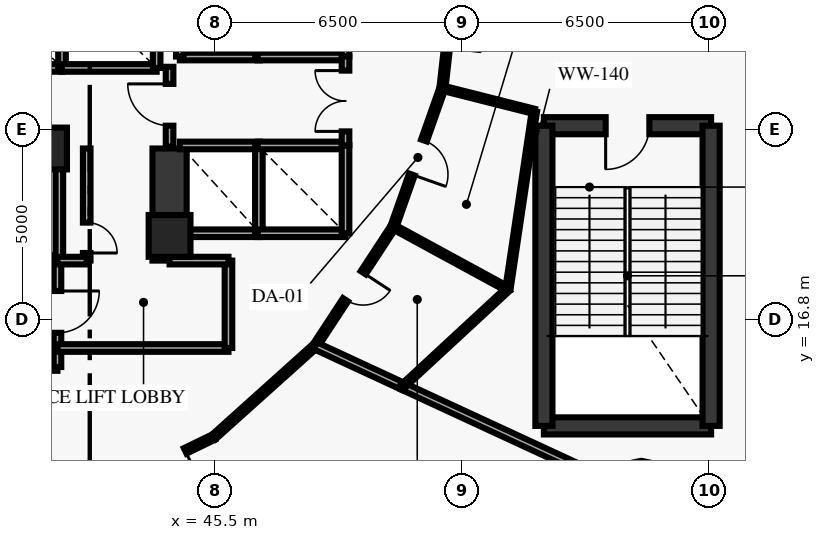
"""IFC4 building model, lengths in metres.
Left out: names, types, materials, properties, quantities, classifications, styles, units other than length and angle.
Written with IfcOpenShell. Run it as: python <this file> out.ifc"""

import sys

from ifc_helpers import new_model, si_unit, direction, frame, frame_2d, origin, origin_2d, place, context, subcontext, project, spatial, rectangle, extrude, element, fill, save


model = new_model("IFC4")
c1 = context("Model", 3, precision=1e-05, world=origin(), true_north=direction((0.0, 1.0)))
c2 = subcontext(c1, "Body", "Model", "MODEL_VIEW")
j1 = project(units=[si_unit("LENGTHUNIT", "METRE"), si_unit("PLANEANGLEUNIT", "RADIAN")], contexts=[c1])
p1 = place(None, origin())
s1 = spatial("IfcSite", under=j1, at=p1, CompositionType="ELEMENT")
p2 = place(p1, origin())
s2 = spatial("IfcBuilding", under=s1, at=p2, CompositionType="ELEMENT")
p3 = place(p2, frame((0.0, 0.0, 11.0)))
s3 = spatial("IfcBuildingStorey", under=s2, at=p3, CompositionType="ELEMENT", Elevation=11.0)
for number, where, z_axis, x_axis in (
    (1, (41.05, 21.3, 0.0), (0.0, 0.0, 1.0), (1.0, 0.0, 0.0)),
    (2, (44.3, 19.0, 0.0), (0.0, 0.0, 1.0), (1.0, 0.0, 0.0)),
):
    element("IfcColumn", number, at=place(p3, frame(where, z_axis=z_axis, x_axis=x_axis)), inside=s3, PredefinedType="PILASTER", context=c2, shape_type="SweptSolid", body=[
        extrude(rectangle(XDim=1.1, YDim=1.1, at=origin_2d()), origin(), (0.0, 0.0, 1.0), 4.7),
    ])
p4 = place(p3, frame((44.3, 18.35, 0.0), z_axis=(0.0, 0.0, 1.0), x_axis=(0.0, 1.0, 0.0)))
e3 = element("IfcWall", 3, at=p4, inside=s3, PredefinedType="SHEAR", context=c2, shape_type="SweptSolid", body=[
    extrude(rectangle(XDim=2.95, YDim=0.9, at=frame_2d((1.475, 0.0))), origin(), (0.0, 0.0, 1.0), 4.7),
])
p5 = place(p3, frame((33.7, 21.3, 0.0), z_axis=(0.0, 0.0, 1.0), x_axis=(1.0, 0.0, 0.0)))
e4 = element("IfcWall", 4, at=p5, inside=s3, PredefinedType="SHEAR", context=c2, shape_type="SweptSolid", body=[
    extrude(rectangle(XDim=7.55, YDim=0.9, at=frame_2d((3.775, 0.0))), origin(), (0.0, 0.0, 1.0), 4.7),
])
p6 = place(p3, frame((54.15, 14.0, 0.0), z_axis=(0.0, 0.0, 1.0), x_axis=(1.0, 0.0, 0.0)))
e5 = element("IfcWall", 5, at=p6, inside=s3, PredefinedType="SHEAR", context=c2, shape_type="SweptSolid", body=[
    extrude(rectangle(XDim=4.4, YDim=0.45, at=frame_2d((2.2, 0.0))), origin(), (0.0, 0.0, 1.0), 4.7),
])
p7 = place(p3, frame((58.55, 21.9, 0.0), z_axis=(0.0, 0.0, 1.0), x_axis=(-1.0, 0.0, 0.0)))
e6 = element("IfcWall", 6, at=p7, inside=s3, PredefinedType="SHEAR", context=c2, shape_type="SweptSolid", body=[
    extrude(rectangle(XDim=4.4, YDim=0.45, at=frame_2d((2.2, 0.0))), origin(), (0.0, 0.0, 1.0), 4.7),
])
p8 = place(p7, frame((1.625, 0.0, 0.0)))
e7 = element("IfcOpeningElement", 7, at=p8, cuts=e6, PredefinedType="OPENING", context=c2, shape_type="SweptSolid", body=[
    extrude(rectangle(XDim=1.15, YDim=2.15, at=frame_2d((0.575, 1.075))), frame((0.0, 0.235, 0.0), z_axis=(0.0, -1.0, 0.0), x_axis=(1.0, 0.0, 0.0)), (0.0, 0.0, 1.0), 0.47),
])
for number, where, z_axis, x_axis in (
    (8, (54.15, 14.0, 0.0), (0.0, 0.0, 1.0), (0.0, 1.0, 0.0)),
    (9, (58.55, 14.0, 0.0), (0.0, 0.0, 1.0), (0.0, 1.0, 0.0)),
):
    element("IfcWall", number, at=place(p3, frame(where, z_axis=z_axis, x_axis=x_axis)), inside=s3, PredefinedType="SHEAR", context=c2, shape_type="SweptSolid", body=[
        extrude(rectangle(XDim=7.9, YDim=0.45, at=frame_2d((3.95, 0.0))), origin(), (0.0, 0.0, 1.0), 4.7),
    ])
p9 = place(p3, frame((44.57, 23.72, 0.0), z_axis=(0.0, 0.0, 1.0), x_axis=(1.0, 0.0, 0.0)))
e10 = element("IfcWall", 10, at=p9, inside=s3, PredefinedType="SOLIDWALL", context=c2, shape_type="SweptSolid", body=[
    extrude(rectangle(XDim=2.11, YDim=0.2, at=frame_2d((1.055, 0.0))), origin(), (0.0, 0.0, 1.0), 4.7),
])
for number, where, z_axis, x_axis in (
    (11, (44.57, 23.72, 0.0), (0.0, 0.0, 1.0), (0.0, 1.0, 0.0)),
    (12, (46.65, 23.72, 0.0), (0.0, 0.0, 1.0), (0.0, 1.0, 0.0)),
):
    element("IfcWall", number, at=place(p3, frame(where, z_axis=z_axis, x_axis=x_axis)), inside=s3, PredefinedType="SOLIDWALL", context=c2, shape_type="SweptSolid", body=[
        extrude(rectangle(XDim=2.41, YDim=0.2, at=frame_2d((1.205, 0.0))), origin(), (0.0, 0.0, 1.0), 4.7),
    ])
p10 = place(p3, frame((46.62, 23.72, 0.0), z_axis=(0.0, 0.0, 1.0), x_axis=(1.0, 0.0, 0.0)))
e13 = element("IfcWall", 13, at=p10, inside=s3, PredefinedType="SOLIDWALL", context=c2, shape_type="SweptSolid", body=[
    extrude(rectangle(XDim=2.31, YDim=0.2, at=frame_2d((1.155, 0.0))), origin(), (0.0, 0.0, 1.0), 4.7),
])
p11 = place(p3, frame((48.93, 23.72, 0.0), z_axis=(0.0, 0.0, 1.0), x_axis=(0.0, 1.0, 0.0)))
e14 = element("IfcWall", 14, at=p11, inside=s3, PredefinedType="SOLIDWALL", context=c2, shape_type="SweptSolid", body=[
    extrude(rectangle(XDim=2.41, YDim=0.2, at=frame_2d((1.205, 0.0))), origin(), (0.0, 0.0, 1.0), 4.7),
])
for number, where, z_axis, x_axis in (
    (15, (44.57, 19.07, 0.0), (0.0, 0.0, 1.0), (1.0, 0.0, 0.0)),
    (16, (44.57, 21.38, 0.0), (0.0, 0.0, 1.0), (1.0, 0.0, 0.0)),
):
    element("IfcWall", number, at=place(p3, frame(where, z_axis=z_axis, x_axis=x_axis)), inside=s3, PredefinedType="SOLIDWALL", context=c2, shape_type="SweptSolid", body=[
        extrude(rectangle(XDim=2.11, YDim=0.2, at=frame_2d((1.055, 0.0))), origin(), (0.0, 0.0, 1.0), 4.7),
    ])
for number, where, z_axis, x_axis in (
    (17, (46.65, 19.07, 0.0), (0.0, 0.0, 1.0), (0.0, 1.0, 0.0)),
    (18, (46.62, 19.07, 0.0), (0.0, 0.0, 1.0), (1.0, 0.0, 0.0)),
    (19, (46.62, 21.38, 0.0), (0.0, 0.0, 1.0), (1.0, 0.0, 0.0)),
    (20, (48.93, 19.07, 0.0), (0.0, 0.0, 1.0), (0.0, 1.0, 0.0)),
):
    element("IfcWall", number, at=place(p3, frame(where, z_axis=z_axis, x_axis=x_axis)), inside=s3, PredefinedType="SOLIDWALL", context=c2, shape_type="SweptSolid", body=[
        extrude(rectangle(XDim=2.31, YDim=0.2, at=frame_2d((1.155, 0.0))), origin(), (0.0, 0.0, 1.0), 4.7),
    ])
p12 = place(p3, frame((38.98, 23.42, 0.0), z_axis=(0.0, 0.0, 1.0), x_axis=(1.0, 0.0, 0.0)))
e21 = element("IfcWall", 21, at=p12, inside=s3, PredefinedType="SOLIDWALL", context=c2, shape_type="SweptSolid", body=[
    extrude(rectangle(XDim=2.5, YDim=0.2, at=frame_2d((1.25, 0.0))), origin(), (0.0, 0.0, 1.0), 4.7),
])
p13 = place(p3, frame((41.47, 23.42, 0.0), z_axis=(0.0, 0.0, 1.0), x_axis=(0.0, 1.0, 0.0)))
e22 = element("IfcWall", 22, at=p13, inside=s3, PredefinedType="SOLIDWALL", context=c2, shape_type="SweptSolid", body=[
    extrude(rectangle(XDim=2.41, YDim=0.2, at=frame_2d((1.205, 0.0))), origin(), (0.0, 0.0, 1.0), 4.7),
])
p14 = place(p3, frame((41.46, 23.42, 0.0), z_axis=(0.0, 0.0, 1.0), x_axis=(1.0, 0.0, 0.0)))
e23 = element("IfcWall", 23, at=p14, inside=s3, PredefinedType="SOLIDWALL", context=c2, shape_type="SweptSolid", body=[
    extrude(rectangle(XDim=2.5, YDim=0.2, at=frame_2d((1.25, 0.0))), origin(), (0.0, 0.0, 1.0), 4.7),
])
p15 = place(p3, frame((43.96, 23.42, 0.0), z_axis=(0.0, 0.0, 1.0), x_axis=(0.0, 1.0, 0.0)))
e24 = element("IfcWall", 24, at=p15, inside=s3, PredefinedType="SOLIDWALL", context=c2, shape_type="SweptSolid", body=[
    extrude(rectangle(XDim=2.41, YDim=0.2, at=frame_2d((1.205, 0.0))), origin(), (0.0, 0.0, 1.0), 4.7),
])
p16 = place(p3, frame((38.57, 18.37, 0.0), z_axis=(0.0, 0.0, 1.0), x_axis=(1.0, 0.0, 0.0)))
e25 = element("IfcWall", 25, at=p16, inside=s3, PredefinedType="SOLIDWALL", context=c2, shape_type="SweptSolid", body=[
    extrude(rectangle(XDim=2.83, YDim=0.2, at=frame_2d((1.415, 0.0))), origin(), (0.0, 0.0, 1.0), 4.7),
])
p17 = place(p16, frame((1.18, 0.0, 0.0)))
e26 = element("IfcOpeningElement", 26, at=p17, cuts=e25, PredefinedType="OPENING", context=c2, shape_type="SweptSolid", body=[
    extrude(rectangle(XDim=1.35, YDim=2.18, at=frame_2d((0.675, 1.09))), frame((0.0, 0.11, 0.0), z_axis=(0.0, -1.0, 0.0), x_axis=(1.0, 0.0, 0.0)), (0.0, 0.0, 1.0), 0.22),
])
p18 = place(p3, frame((41.4, 18.37, 0.0), z_axis=(0.0, 0.0, 1.0), x_axis=(0.0, 1.0, 0.0)))
e27 = element("IfcWall", 27, at=p18, inside=s3, PredefinedType="SOLIDWALL", context=c2, shape_type="SweptSolid", body=[
    extrude(rectangle(XDim=2.71, YDim=0.2, at=frame_2d((1.355, 0.0))), origin(), (0.0, 0.0, 1.0), 4.7),
])
p19 = place(p3, frame((48.93, 21.38, 0.0), z_axis=(0.0, 0.0, 1.0), x_axis=(0.0, 1.0, 0.0)))
e28 = element("IfcWall", 28, at=p19, inside=s3, PredefinedType="SOLIDWALL", context=c2, shape_type="SweptSolid", body=[
    extrude(rectangle(XDim=2.34, YDim=0.2, at=frame_2d((1.17, 0.0))), origin(), (0.0, 0.0, 1.0), 4.7),
])
p20 = place(p19, frame((0.37, 0.0, 0.0)))
e29 = element("IfcOpeningElement", 29, at=p20, cuts=e28, PredefinedType="OPENING", context=c2, shape_type="SweptSolid", body=[
    extrude(rectangle(XDim=1.6, YDim=2.2, at=frame_2d((0.8, 1.1))), frame((0.0, 0.11, 0.0), z_axis=(0.0, -1.0, 0.0), x_axis=(1.0, 0.0, 0.0)), (0.0, 0.0, 1.0), 0.22),
])
p21 = place(p3, frame((44.3, 21.35, 0.0), z_axis=(0.0, 0.0, 1.0), x_axis=(0.0, 1.0, 0.0)))
e30 = element("IfcWall", 30, at=p21, inside=s3, PredefinedType="SOLIDWALL", context=c2, shape_type="SweptSolid", body=[
    extrude(rectangle(XDim=2.1, YDim=0.2, at=frame_2d((1.05, 0.0))), origin(), (0.0, 0.0, 1.0), 3.92),
])
p22 = place(p21, frame((0.55, 0.0, 0.0)))
e31 = element("IfcOpeningElement", 31, at=p22, cuts=e30, PredefinedType="OPENING", context=c2, shape_type="SweptSolid", body=[
    extrude(rectangle(XDim=1.1, YDim=2.15, at=frame_2d((0.55, 1.075))), frame((0.0, 0.11, 0.0), z_axis=(0.0, -1.0, 0.0), x_axis=(1.0, 0.0, 0.0)), (0.0, 0.0, 1.0), 0.22),
])
p23 = place(p3, frame((33.8, 15.55, 0.0), z_axis=(0.0, 0.0, 1.0), x_axis=(1.0, 0.0, 0.0)))
e32 = element("IfcWall", 32, at=p23, inside=s3, PredefinedType="SOLIDWALL", context=c2, shape_type="SweptSolid", body=[
    extrude(rectangle(XDim=7.55, YDim=0.2, at=frame_2d((3.775, 0.0))), origin(), (0.0, 0.0, 1.0), 4.7),
])
p24 = place(p3, frame((41.35, 15.55, 0.0), z_axis=(0.0, 0.0, 1.0), x_axis=(0.0, 1.0, 0.0)))
e33 = element("IfcWall", 33, at=p24, inside=s3, PredefinedType="SOLIDWALL", context=c2, shape_type="SweptSolid", body=[
    extrude(rectangle(XDim=2.8, YDim=0.2, at=frame_2d((1.4, 0.0))), origin(), (0.0, 0.0, 1.0), 4.7),
])
p25 = place(p24, frame((0.9, 0.0, 0.0)))
e34 = element("IfcOpeningElement", 34, at=p25, cuts=e33, PredefinedType="OPENING", context=c2, shape_type="SweptSolid", body=[
    extrude(rectangle(XDim=1.1, YDim=2.15, at=frame_2d((0.55, 1.075))), frame((0.0, 0.11, 0.0), z_axis=(0.0, -1.0, 0.0), x_axis=(1.0, 0.0, 0.0)), (0.0, 0.0, 1.0), 0.22),
])
p26 = place(p3, frame((41.35, 16.05, 0.0), z_axis=(0.0, 0.0, 1.0), x_axis=(1.0, 0.0, 0.0)))
e35 = element("IfcWall", 35, at=p26, inside=s3, PredefinedType="SOLIDWALL", context=c2, shape_type="SweptSolid", body=[
    extrude(rectangle(XDim=4.5, YDim=0.2, at=frame_2d((2.25, 0.0))), origin(), (0.0, 0.0, 1.0), 4.7),
])
p27 = place(p3, frame((45.85, 16.05, 0.0), z_axis=(0.0, 0.0, 1.0), x_axis=(0.0, 1.0, 0.0)))
e36 = element("IfcWall", 36, at=p27, inside=s3, PredefinedType="SOLIDWALL", context=c2, shape_type="SweptSolid", body=[
    extrude(rectangle(XDim=2.3, YDim=0.2, at=frame_2d((1.15, 0.0))), origin(), (0.0, 0.0, 1.0), 4.7),
])
p28 = place(p3, frame((44.3, 18.35, 0.0), z_axis=(0.0, 0.0, 1.0), x_axis=(1.0, 0.0, 0.0)))
e37 = element("IfcWall", 37, at=p28, inside=s3, PredefinedType="SOLIDWALL", context=c2, shape_type="SweptSolid", body=[
    extrude(rectangle(XDim=1.55, YDim=0.2, at=frame_2d((0.775, 0.0))), origin(), (0.0, 0.0, 1.0), 4.7),
])
p29 = place(p3, frame((42.12, 18.35, 0.0), z_axis=(0.0, 0.0, 1.0), x_axis=(0.0, 1.0, 0.0)))
e38 = element("IfcWall", 38, at=p29, inside=s3, PredefinedType="SOLIDWALL", context=c2, shape_type="SweptSolid", body=[
    extrude(rectangle(XDim=2.95, YDim=0.2, at=frame_2d((1.475, 0.0))), origin(), (0.0, 0.0, 1.0), 4.7),
])
p30 = place(p29, frame((0.2, 0.0, 0.0)))
e39 = element("IfcOpeningElement", 39, at=p30, cuts=e38, PredefinedType="OPENING", context=c2, shape_type="SweptSolid", body=[
    extrude(rectangle(XDim=0.8, YDim=2.05, at=frame_2d((0.4, 1.025))), frame((0.0, 0.11, 0.0), z_axis=(0.0, -1.0, 0.0), x_axis=(1.0, 0.0, 0.0)), (0.0, 0.0, 1.0), 0.22),
])
p31 = place(p3, frame((41.35, 18.35, 0.0), z_axis=(0.0, 0.0, 1.0), x_axis=(1.0, 0.0, 0.0)))
e40 = element("IfcWall", 40, at=p31, inside=s3, PredefinedType="SOLIDWALL", context=c2, shape_type="SweptSolid", body=[
    extrude(rectangle(XDim=0.77, YDim=0.2, at=frame_2d((0.385, 0.0))), origin(), (0.0, 0.0, 1.0), 4.7),
])
p32 = place(p3, frame((45.46, 13.706, 0.0), z_axis=(0.0, 0.0, 1.0), x_axis=(-0.899789784655, -0.436323668199, 0.0)))
e41 = element("IfcWall", 41, at=p32, inside=s3, PredefinedType="PARTITIONING", context=c2, shape_type="SweptSolid", body=[
    extrude(rectangle(XDim=3.463, YDim=0.16, at=frame_2d((1.731, 0.0))), origin(), (0.0, 0.0, 1.0), 4.7),
])
p33 = place(p32, frame((0.832, 0.0, 0.0)))
e42 = element("IfcOpeningElement", 42, at=p33, cuts=e41, PredefinedType="OPENING", context=c2, shape_type="SweptSolid", body=[
    extrude(rectangle(XDim=1.8, YDim=2.3, at=frame_2d((0.9, 1.15))), frame((0.0, 0.09, 0.0), z_axis=(0.0, -1.0, 0.0), x_axis=(1.0, 0.0, 0.0)), (0.0, 0.0, 1.0), 0.18),
])
p34 = place(p3, frame((45.46, 13.706, 0.0), z_axis=(0.0, 0.0, 1.0), x_axis=(0.744066617248, 0.668105432621, 0.0)))
e43 = element("IfcWall", 43, at=p34, inside=s3, PredefinedType="PARTITIONING", context=c2, shape_type="SweptSolid", body=[
    extrude(rectangle(XDim=3.596, YDim=0.16, at=frame_2d((1.798, 0.0))), origin(), (0.0, 0.0, 1.0), 4.7),
])
p35 = place(p3, frame((50.189, 19.24, 0.0), z_axis=(0.0, 0.0, 1.0), x_axis=(-0.548318837904, -0.836269365694, 0.0)))
e44 = element("IfcWall", 44, at=p35, inside=s3, PredefinedType="PARTITIONING", context=c2, shape_type="SweptSolid", body=[
    extrude(rectangle(XDim=3.744, YDim=0.16, at=frame_2d((1.872, 0.0))), origin(), (0.0, 0.0, 1.0), 4.7),
])
p36 = place(p35, frame((1.447, 0.0, 0.0)))
e45 = element("IfcOpeningElement", 45, at=p36, cuts=e44, PredefinedType="OPENING", context=c2, shape_type="SweptSolid", body=[
    extrude(rectangle(XDim=0.85, YDim=2.1, at=frame_2d((0.425, 1.05))), frame((0.0, 0.09, 0.0), z_axis=(0.0, -1.0, 0.0), x_axis=(1.0, 0.0, 0.0)), (0.0, 0.0, 1.0), 0.18),
])
p37 = place(p3, frame((51.48, 22.887, 0.0), z_axis=(0.0, 0.0, 1.0), x_axis=(-0.333704620558, -0.942677689467, 0.0)))
e46 = element("IfcWall", 46, at=p37, inside=s3, PredefinedType="PARTITIONING", context=c2, shape_type="SweptSolid", body=[
    extrude(rectangle(XDim=3.869, YDim=0.16, at=frame_2d((1.934, 0.0))), origin(), (0.0, 0.0, 1.0), 4.7),
])
p38 = place(p37, frame((1.459, 0.0, 0.0)))
e47 = element("IfcOpeningElement", 47, at=p38, cuts=e46, PredefinedType="OPENING", context=c2, shape_type="SweptSolid", body=[
    extrude(rectangle(XDim=0.95, YDim=2.1, at=frame_2d((0.475, 1.05))), frame((0.0, 0.09, 0.0), z_axis=(0.0, -1.0, 0.0), x_axis=(1.0, 0.0, 0.0)), (0.0, 0.0, 1.0), 0.18),
])
p39 = place(p3, frame((51.92, 26.8, 0.0), z_axis=(0.0, 0.0, 1.0), x_axis=(-0.111724363671, -0.99373923469, 0.0)))
e48 = element("IfcWall", 48, at=p39, inside=s3, PredefinedType="PARTITIONING", context=c2, shape_type="SweptSolid", body=[
    extrude(rectangle(XDim=3.938, YDim=0.16, at=frame_2d((1.969, 0.0))), origin(), (0.0, 0.0, 1.0), 4.7),
])
p40 = place(p39, frame((1.069, 0.0, 0.0)))
e49 = element("IfcOpeningElement", 49, at=p40, cuts=e48, PredefinedType="OPENING", context=c2, shape_type="SweptSolid", body=[
    extrude(rectangle(XDim=1.8, YDim=2.3, at=frame_2d((0.9, 1.15))), frame((0.0, 0.09, 0.0), z_axis=(0.0, -1.0, 0.0), x_axis=(1.0, 0.0, 0.0)), (0.0, 0.0, 1.0), 0.18),
])
p41 = place(p3, frame((48.136, 16.109, 0.0), z_axis=(0.0, 0.0, 1.0), x_axis=(0.907508335547, -0.420034071133, 0.0)))
e50 = element("IfcWall", 50, at=p41, inside=s3, PredefinedType="PARTITIONING", context=c2, shape_type="SweptSolid", body=[
    extrude(rectangle(XDim=2.538, YDim=0.2, at=frame_2d((1.269, 0.0))), origin(), (0.0, 0.0, 1.0), 4.7),
])
p42 = place(p3, frame((50.439, 15.043, 0.0), z_axis=(0.0, 0.0, 1.0), x_axis=(0.907524397356, -0.419999366908, 0.0)))
e51 = element("IfcWall", 51, at=p42, inside=s3, PredefinedType="PARTITIONING", context=c2, shape_type="SweptSolid", body=[
    extrude(rectangle(XDim=7.614, YDim=0.2, at=frame_2d((3.807, 0.0))), origin(), (0.0, 0.0, 1.0), 4.7),
])
p43 = place(p3, frame((50.189, 19.24, 0.0), z_axis=(0.0, 0.0, 1.0), x_axis=(0.878392721738, -0.477939563541, 0.0)))
e52 = element("IfcWall", 52, at=p43, inside=s3, PredefinedType="PARTITIONING", context=c2, shape_type="SweptSolid", body=[
    extrude(rectangle(XDim=3.431, YDim=0.14, at=frame_2d((1.716, 0.0))), origin(), (0.0, 0.0, 1.0), 4.7),
])
p44 = place(p3, frame((51.48, 22.887, 0.0), z_axis=(0.0, 0.0, 1.0), x_axis=(0.969564374521, -0.244836524357, 0.0)))
e53 = element("IfcWall", 53, at=p44, inside=s3, PredefinedType="PARTITIONING", context=c2, shape_type="SweptSolid", body=[
    extrude(rectangle(XDim=2.496, YDim=0.14, at=frame_2d((1.248, 0.0))), origin(), (0.0, 0.0, 1.0), 4.7),
])
p45 = place(p3, frame((50.439, 15.043, 0.0), z_axis=(0.0, 0.0, 1.0), x_axis=(0.734032370371, 0.679114481695, 0.0)))
e54 = element("IfcWall", 54, at=p45, inside=s3, PredefinedType="PARTITIONING", context=c2, shape_type="SweptSolid", body=[
    extrude(rectangle(XDim=3.765, YDim=0.14, at=frame_2d((1.883, 0.0))), origin(), (0.0, 0.0, 1.0), 4.7),
])
p46 = place(p3, frame((53.203, 17.6, 0.0), z_axis=(0.0, 0.0, 1.0), x_axis=(0.147441370436, 0.989070797407, 0.0)))
e55 = element("IfcWall", 55, at=p46, inside=s3, PredefinedType="PARTITIONING", context=c2, shape_type="SweptSolid", body=[
    extrude(rectangle(XDim=4.728, YDim=0.14, at=frame_2d((2.364, 0.0))), origin(), (0.0, 0.0, 1.0), 4.7),
])
p47 = place(p8, origin())
e56 = element("IfcDoor", 56, at=p47, inside=s3, OperationType="SINGLE_SWING_RIGHT", PredefinedType="DOOR", context=c2, shape_type="SweptSolid", body=[
    extrude(rectangle(XDim=1.15, YDim=2.15, at=frame_2d((0.575, 1.075))), frame((0.0, 0.025, 0.0), z_axis=(0.0, -1.0, 0.0), x_axis=(1.0, 0.0, 0.0)), (0.0, 0.0, 1.0), 0.05),
])
fill(e7, e56)
p48 = place(p20, origin())
e57 = element("IfcDoor", 57, at=p48, inside=s3, OperationType="DOUBLE_DOOR_SINGLE_SWING", PredefinedType="DOOR", context=c2, shape_type="SweptSolid", body=[
    extrude(rectangle(XDim=1.6, YDim=2.2, at=frame_2d((0.8, 1.1))), frame((0.0, 0.025, 0.0), z_axis=(0.0, -1.0, 0.0), x_axis=(1.0, 0.0, 0.0)), (0.0, 0.0, 1.0), 0.05),
])
fill(e29, e57)
p49 = place(p22, origin())
e58 = element("IfcDoor", 58, at=p49, inside=s3, OperationType="SINGLE_SWING_RIGHT", PredefinedType="DOOR", context=c2, shape_type="SweptSolid", body=[
    extrude(rectangle(XDim=1.1, YDim=2.15, at=frame_2d((0.55, 1.075))), frame((0.0, 0.025, 0.0), z_axis=(0.0, -1.0, 0.0), x_axis=(1.0, 0.0, 0.0)), (0.0, 0.0, 1.0), 0.05),
])
fill(e31, e58)
p50 = place(p25, origin())
e59 = element("IfcDoor", 59, at=p50, inside=s3, OperationType="SINGLE_SWING_RIGHT", PredefinedType="DOOR", context=c2, shape_type="SweptSolid", body=[
    extrude(rectangle(XDim=1.1, YDim=2.15, at=frame_2d((0.55, 1.075))), frame((0.0, 0.025, 0.0), z_axis=(0.0, -1.0, 0.0), x_axis=(1.0, 0.0, 0.0)), (0.0, 0.0, 1.0), 0.05),
])
fill(e34, e59)
p51 = place(p30, origin())
e60 = element("IfcDoor", 60, at=p51, inside=s3, OperationType="SINGLE_SWING_LEFT", PredefinedType="DOOR", context=c2, shape_type="SweptSolid", body=[
    extrude(rectangle(XDim=0.8, YDim=2.05, at=frame_2d((0.4, 1.025))), frame((0.0, 0.025, 0.0), z_axis=(0.0, -1.0, 0.0), x_axis=(1.0, 0.0, 0.0)), (0.0, 0.0, 1.0), 0.05),
])
fill(e39, e60)
p52 = place(p33, origin())
e61 = element("IfcDoor", 61, at=p52, inside=s3, OperationType="DOUBLE_DOOR_SINGLE_SWING", PredefinedType="DOOR", context=c2, shape_type="SweptSolid", body=[
    extrude(rectangle(XDim=1.8, YDim=2.3, at=frame_2d((0.9, 1.15))), frame((0.0, 0.025, 0.0), z_axis=(0.0, -1.0, 0.0), x_axis=(1.0, 0.0, 0.0)), (0.0, 0.0, 1.0), 0.05),
])
fill(e42, e61)
p53 = place(p36, origin())
e62 = element("IfcDoor", 62, at=p53, inside=s3, OperationType="SINGLE_SWING_LEFT", PredefinedType="DOOR", context=c2, shape_type="SweptSolid", body=[
    extrude(rectangle(XDim=0.85, YDim=2.1, at=frame_2d((0.425, 1.05))), frame((0.0, 0.025, 0.0), z_axis=(0.0, -1.0, 0.0), x_axis=(1.0, 0.0, 0.0)), (0.0, 0.0, 1.0), 0.05),
])
fill(e45, e62)
p54 = place(p38, origin())
e63 = element("IfcDoor", 63, at=p54, inside=s3, OperationType="SINGLE_SWING_RIGHT", PredefinedType="DOOR", context=c2, shape_type="SweptSolid", body=[
    extrude(rectangle(XDim=0.95, YDim=2.1, at=frame_2d((0.475, 1.05))), frame((0.0, 0.025, 0.0), z_axis=(0.0, -1.0, 0.0), x_axis=(1.0, 0.0, 0.0)), (0.0, 0.0, 1.0), 0.05),
])
fill(e47, e63)
save(model, sys.argv[1])
